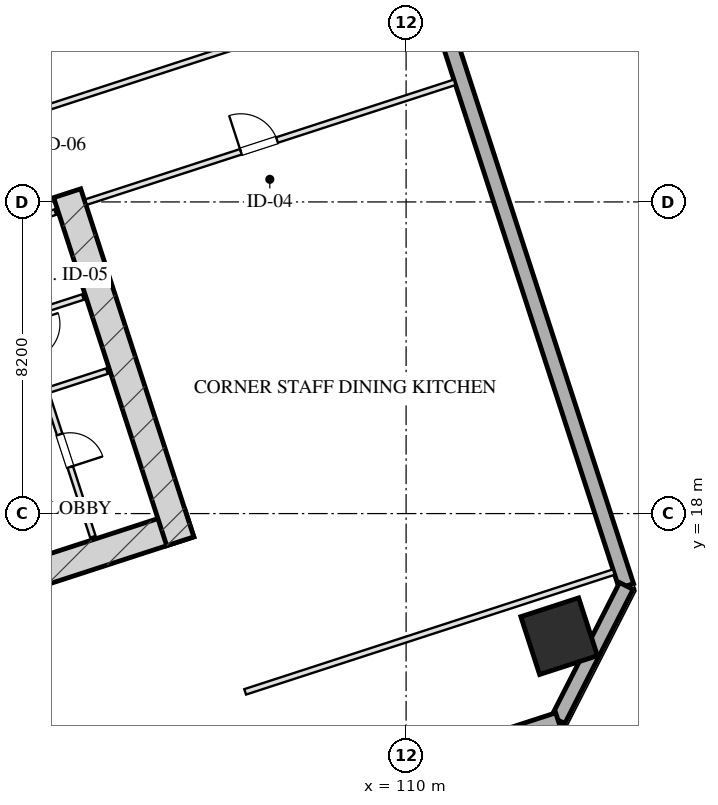
"""IFC4 building model, lengths in metres.
Left out: names, types, materials, properties, quantities, classifications, styles, units other than length and angle.
Written with IfcOpenShell. Run it as: python <this file> out.ifc"""

import sys

from ifc_helpers import new_model, si_unit, direction, frame, frame_2d, origin, origin_2d, place, context, subcontext, project, spatial, rectangle, hollow_rectangle, extrude, element, fill, save


model = new_model("IFC4")
c1 = context("Model", 3, precision=1e-05, world=origin(), true_north=direction((0.0, 1.0)))
c2 = subcontext(c1, "Body", "Model", "MODEL_VIEW")
j1 = project(units=[si_unit("LENGTHUNIT", "METRE"), si_unit("PLANEANGLEUNIT", "RADIAN")], contexts=[c1])
p1 = place(None, origin())
s1 = spatial("IfcSite", under=j1, at=p1, CompositionType="ELEMENT")
p2 = place(p1, origin())
s2 = spatial("IfcBuilding", under=s1, at=p2, CompositionType="ELEMENT")
p3 = place(p2, frame((0.0, 0.0, 71.3)))
s3 = spatial("IfcBuildingStorey", under=s2, at=p3, CompositionType="ELEMENT", Elevation=71.3)
p4 = place(p3, frame((88.559, 12.629, 0.0), z_axis=(0.0, 0.0, 1.0), x_axis=(0.951056072937, 0.309018358888, 0.0)))
e1 = element("IfcWall", 1, at=p4, inside=s3, PredefinedType="SHEAR", context=c2, shape_type="SweptSolid", body=[
    extrude(rectangle(XDim=16.55, YDim=0.75, at=frame_2d((8.275, 0.0))), origin(), (0.0, 0.0, 1.0), 3.45),
])
p5 = place(p3, frame((101.082, 26.429, 0.0), z_axis=(0.0, 0.0, 1.0), x_axis=(0.309016134813, -0.951056795583, 0.0)))
e2 = element("IfcWall", 2, at=p5, inside=s3, PredefinedType="SHEAR", context=c2, shape_type="SweptSolid", body=[
    extrude(rectangle(XDim=9.63, YDim=0.75, at=frame_2d((4.815, 0.0))), origin(), (0.0, 0.0, 1.0), 3.45),
])
p6 = place(p3, frame((114.027, 14.774, 0.0), z_axis=(0.0, 0.0, 1.0), x_axis=(0.951056516295, 0.309016994375, 0.0)))
e3 = element("IfcColumn", 3, at=p6, inside=s3, PredefinedType="COLUMN", context=c2, shape_type="SweptSolid", body=[
    extrude(hollow_rectangle(XDim=1.6, YDim=1.6, WallThickness=0.055, at=origin_2d()), origin(), (0.0, 0.0, 1.0), 3.451),
])
p7 = place(p3, frame((100.345, 63.648, 0.0), z_axis=(0.0, 0.0, 1.0), x_axis=(0.309014526607, -0.951057318118, 0.0)))
e4 = element("IfcWall", 4, at=p7, inside=s3, PredefinedType="SOLIDWALL", context=c2, shape_type="SweptSolid", body=[
    extrude(rectangle(XDim=50.0, YDim=0.4, at=frame_2d((25.0, 0.0))), origin(), (0.0, 0.0, 1.0), 2.61),
])
p8 = place(p7, frame((30.15, 0.0, 0.75)))
e5 = element("IfcOpeningElement", 5, at=p8, cuts=e4, PredefinedType="OPENING", context=c2, shape_type="SweptSolid", body=[
    extrude(rectangle(XDim=2.5, YDim=1.46, at=frame_2d((1.25, 0.73))), frame((0.0, 0.21, 0.0), z_axis=(0.0, -1.0, 0.0), x_axis=(1.0, 0.0, 0.0)), (0.0, 0.0, 1.0), 0.42),
])
p9 = place(p7, frame((21.445, 0.0, 0.0)))
e6 = element("IfcOpeningElement", 6, at=p9, cuts=e4, PredefinedType="OPENING", context=c2, shape_type="SweptSolid", body=[
    extrude(rectangle(XDim=1.1, YDim=2.15, at=frame_2d((0.55, 1.075))), frame((0.0, 0.21, 0.0), z_axis=(0.0, -1.0, 0.0), x_axis=(1.0, 0.0, 0.0)), (0.0, 0.0, 1.0), 0.42),
])
p10 = place(p3, frame((115.795, 16.095, 0.0), z_axis=(0.0, 0.0, 1.0), x_axis=(-0.453958106755, -0.891023028497, 0.0)))
e7 = element("IfcWall", 7, at=p10, inside=s3, PredefinedType="SOLIDWALL", context=c2, shape_type="SweptSolid", body=[
    extrude(rectangle(XDim=3.96, YDim=0.4, at=frame_2d((1.98, 0.0))), origin(), (0.0, 0.0, 1.0), 2.61),
])
p11 = place(p3, frame((113.998, 12.567, 0.0), z_axis=(0.0, 0.0, 1.0), x_axis=(-0.951055939317, -0.309018770125, 0.0)))
e8 = element("IfcWall", 8, at=p11, inside=s3, PredefinedType="SOLIDWALL", context=c2, shape_type="SweptSolid", body=[
    extrude(rectangle(XDim=32.4, YDim=0.4, at=frame_2d((16.2, 0.0))), origin(), (0.0, 0.0, 1.0), 2.61),
])
p12 = place(p3, frame((97.727, 24.944, 0.0), z_axis=(0.0, 0.0, 1.0), x_axis=(0.951036872128, 0.309077446369, 0.0)))
e9 = element("IfcWall", 9, at=p12, inside=s3, PredefinedType="PARTITIONING", context=c2, shape_type="SweptSolid", body=[
    extrude(rectangle(XDim=3.2, YDim=0.15, at=frame_2d((1.6, 0.0))), origin(), (0.0, 0.0, 1.0), 3.175),
])
p13 = place(p12, frame((0.22, 0.0, 0.0)))
e10 = element("IfcOpeningElement", 10, at=p13, cuts=e9, PredefinedType="OPENING", context=c2, shape_type="SweptSolid", body=[
    extrude(rectangle(XDim=0.95, YDim=2.05, at=frame_2d((0.475, 1.025))), frame((0.0, 0.085, 0.0), z_axis=(0.0, -1.0, 0.0), x_axis=(1.0, 0.0, 0.0)), (0.0, 0.0, 1.0), 0.17),
])
p14 = place(p12, frame((1.95, 0.0, 0.0)))
e11 = element("IfcOpeningElement", 11, at=p14, cuts=e9, PredefinedType="OPENING", context=c2, shape_type="SweptSolid", body=[
    extrude(rectangle(XDim=0.9, YDim=2.05, at=frame_2d((0.45, 1.025))), frame((0.0, 0.085, 0.0), z_axis=(0.0, -1.0, 0.0), x_axis=(1.0, 0.0, 0.0)), (0.0, 0.0, 1.0), 0.17),
])
p15 = place(p3, frame((99.153, 25.408, 0.0), z_axis=(0.0, 0.0, 1.0), x_axis=(0.309016001439, -0.951056838919, 0.0)))
e12 = element("IfcWall", 12, at=p15, inside=s3, PredefinedType="PARTITIONING", context=c2, shape_type="SweptSolid", body=[
    extrude(rectangle(XDim=8.43, YDim=0.15, at=frame_2d((4.215, 0.0))), origin(), (0.0, 0.0, 1.0), 3.175),
])
p16 = place(p15, frame((2.55, 0.0, 0.0)))
e13 = element("IfcOpeningElement", 13, at=p16, cuts=e12, PredefinedType="OPENING", context=c2, shape_type="SweptSolid", body=[
    extrude(rectangle(XDim=0.95, YDim=2.05, at=frame_2d((0.475, 1.025))), frame((0.0, 0.085, 0.0), z_axis=(0.0, -1.0, 0.0), x_axis=(1.0, 0.0, 0.0)), (0.0, 0.0, 1.0), 0.17),
])
p17 = place(p15, frame((5.6, 0.0, 0.0)))
e14 = element("IfcOpeningElement", 14, at=p17, cuts=e12, PredefinedType="OPENING", context=c2, shape_type="SweptSolid", body=[
    extrude(rectangle(XDim=0.9, YDim=2.05, at=frame_2d((0.45, 1.025))), frame((0.0, 0.085, 0.0), z_axis=(0.0, -1.0, 0.0), x_axis=(1.0, 0.0, 0.0)), (0.0, 0.0, 1.0), 0.17),
])
for number, where, z_axis, x_axis in (
    (15, (100.513, 21.223, 0.0), (0.0, 0.0, 1.0), (0.951, 0.309, 0.0)),
    (16, (99.879, 23.173, 0.0), (0.0, 0.0, 1.0), (0.951, 0.309, 0.0)),
):
    element("IfcWall", number, at=place(p3, frame(where, z_axis=z_axis, x_axis=x_axis)), inside=s3, PredefinedType="PARTITIONING", context=c2, shape_type="SweptSolid", body=[
        extrude(rectangle(XDim=1.7, YDim=0.15, at=frame_2d((0.85, 0.0))), origin(), (0.0, 0.0, 1.0), 3.175),
    ])
p18 = place(p3, frame((105.765, 13.309, 0.0), z_axis=(0.0, 0.0, 1.0), x_axis=(0.951054294345, 0.309023832749, 0.0)))
e17 = element("IfcWall", 17, at=p18, inside=s3, PredefinedType="PARTITIONING", context=c2, shape_type="SweptSolid", body=[
    extrude(rectangle(XDim=10.2, YDim=0.15, at=frame_2d((5.1, 0.0))), origin(), (0.0, 0.0, 1.0), 3.175),
])
p19 = place(p3, frame((101.578, 26.196, 0.0), z_axis=(0.0, 0.0, 1.0), x_axis=(0.951059043131, 0.309009217467, 0.0)))
e18 = element("IfcWall", 18, at=p19, inside=s3, PredefinedType="PARTITIONING", context=c2, shape_type="SweptSolid", body=[
    extrude(rectangle(XDim=10.2, YDim=0.15, at=frame_2d((5.1, 0.0))), origin(), (0.0, 0.0, 1.0), 3.175),
])
p20 = place(p19, frame((4.284, 0.0, 0.0)))
e19 = element("IfcOpeningElement", 19, at=p20, cuts=e18, PredefinedType="OPENING", context=c2, shape_type="SweptSolid", body=[
    extrude(rectangle(XDim=1.0, YDim=2.05, at=frame_2d((0.5, 1.025))), frame((0.0, 0.085, 0.0), z_axis=(0.0, -1.0, 0.0), x_axis=(1.0, 0.0, 0.0)), (0.0, 0.0, 1.0), 0.17),
])
p21 = place(p3, frame((95.638, 27.084, 0.0), z_axis=(0.0, 0.0, 1.0), x_axis=(0.951055837847, 0.309019082414, 0.0)))
e20 = element("IfcWall", 20, at=p21, inside=s3, PredefinedType="PARTITIONING", context=c2, shape_type="SweptSolid", body=[
    extrude(rectangle(XDim=15.575, YDim=0.15, at=frame_2d((7.788, 0.0))), origin(), (0.0, 0.0, 1.0), 3.175),
])
p22 = place(p17, origin())
e21 = element("IfcDoor", 21, at=p22, inside=s3, OperationType="SINGLE_SWING_RIGHT", PredefinedType="DOOR", context=c2, shape_type="SweptSolid", body=[
    extrude(rectangle(XDim=0.9, YDim=2.05, at=frame_2d((0.45, 1.025))), frame((0.0, 0.025, 0.0), z_axis=(0.0, -1.0, 0.0), x_axis=(1.0, 0.0, 0.0)), (0.0, 0.0, 1.0), 0.05),
])
fill(e14, e21)
p23 = place(p20, origin())
e22 = element("IfcDoor", 22, at=p23, inside=s3, OperationType="SINGLE_SWING_LEFT", PredefinedType="DOOR", context=c2, shape_type="SweptSolid", body=[
    extrude(rectangle(XDim=1.0, YDim=2.05, at=frame_2d((0.5, 1.025))), frame((0.0, 0.025, 0.0), z_axis=(0.0, -1.0, 0.0), x_axis=(1.0, 0.0, 0.0)), (0.0, 0.0, 1.0), 0.05),
])
fill(e19, e22)
save(model, sys.argv[1])
